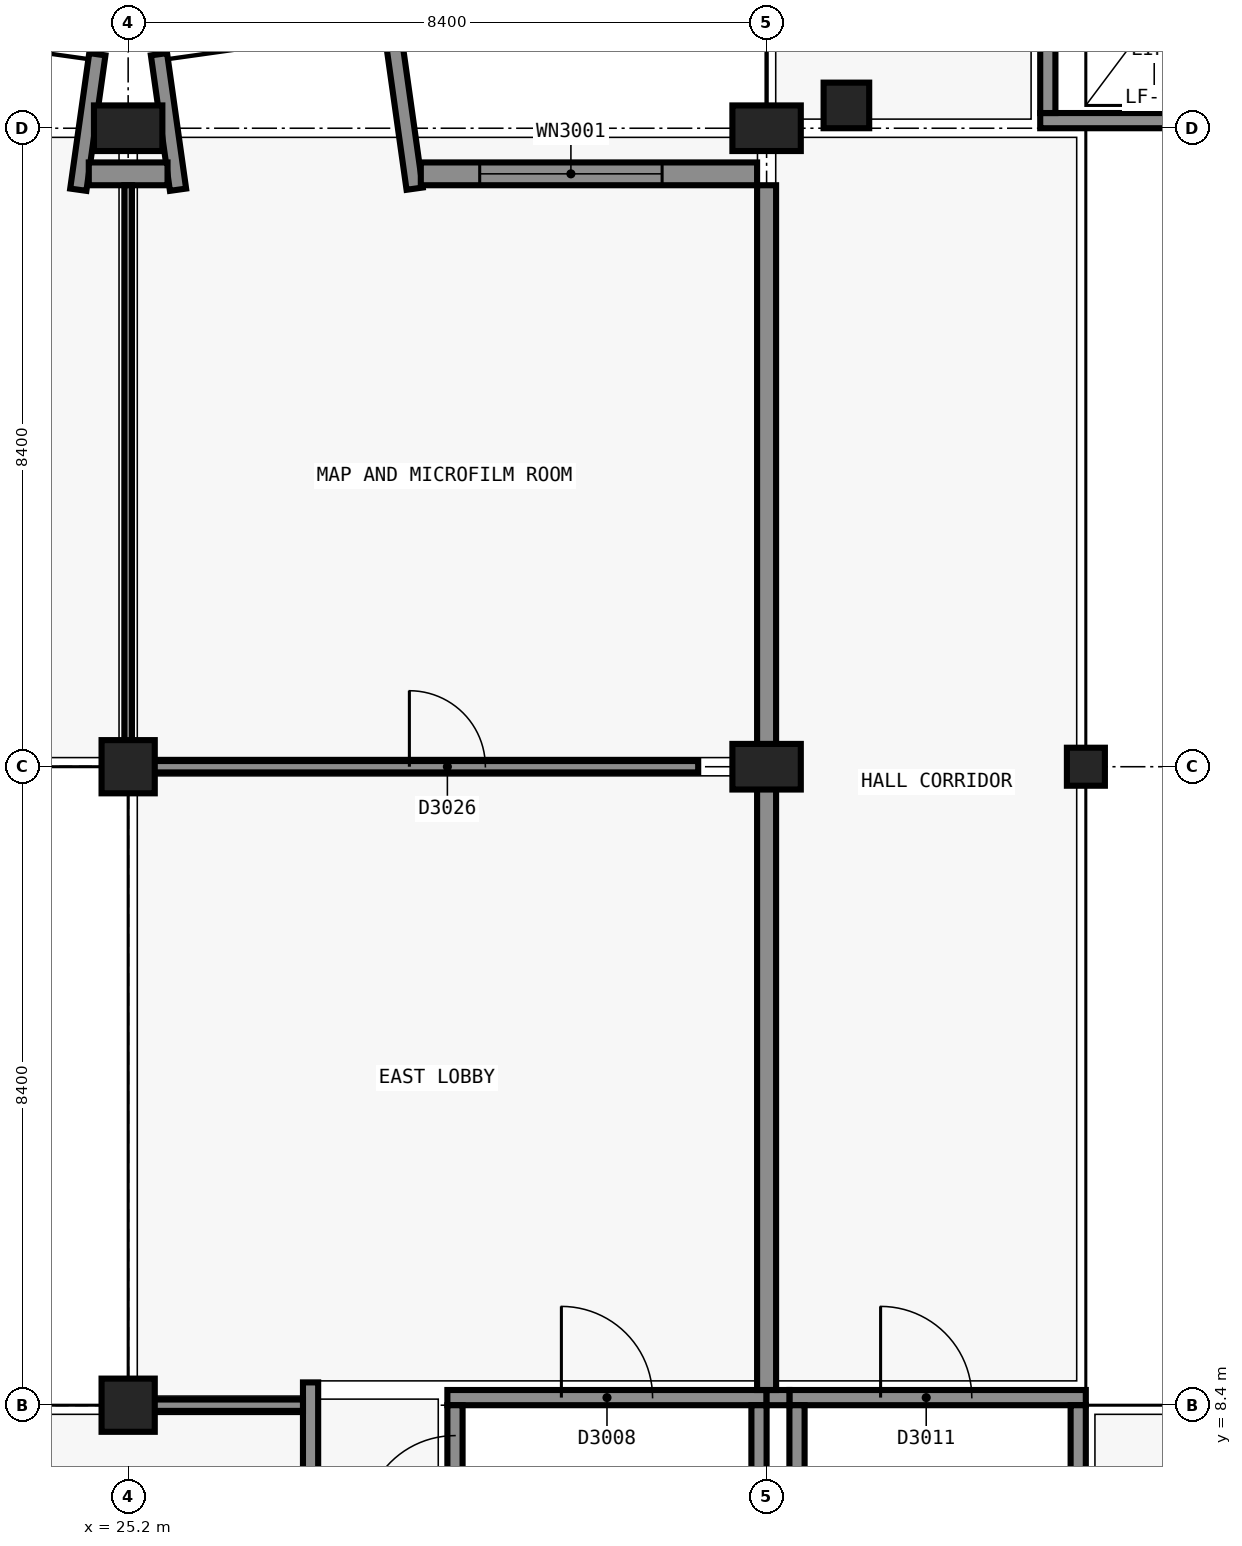
"""IFC4 building model, lengths in metres.
Left out: names, types, materials, properties, quantities, classifications, styles, units other than length and angle.
Written with IfcOpenShell. Run it as: python <this file> out.ifc"""

import sys

from ifc_helpers import new_model, si_unit, direction, frame, frame_2d, origin, origin_2d, place, context, subcontext, project, spatial, rectangle, extrude, element, fill, save


model = new_model("IFC4")
c1 = context("Model", 3, precision=1e-05, world=origin(), true_north=direction((0.0, 1.0)))
c2 = subcontext(c1, "Body", "Model", "MODEL_VIEW")
j1 = project(units=[si_unit("LENGTHUNIT", "METRE"), si_unit("PLANEANGLEUNIT", "RADIAN")], contexts=[c1])
p1 = place(None, origin())
s1 = spatial("IfcSite", under=j1, at=p1, CompositionType="ELEMENT")
p2 = place(p1, origin())
s2 = spatial("IfcBuilding", under=s1, at=p2, CompositionType="ELEMENT")
p3 = place(p2, frame((0.0, 0.0, 15.0)))
s3 = spatial("IfcBuildingStorey", under=s2, at=p3, CompositionType="ELEMENT", Elevation=15.0)
p4 = place(p3, frame((29.4, 8.5, 0.0), z_axis=(0.0, 0.0, 1.0), x_axis=(1.0, 0.0, 0.0)))
e1 = element("IfcWall", 1, at=p4, inside=s3, PredefinedType="SHEAR", context=c2, shape_type="SweptSolid", body=[
    extrude(rectangle(XDim=4.2, YDim=0.2, at=frame_2d((2.1, 0.0))), origin(), (0.0, 0.0, 1.0), 4.8),
])
p5 = place(p4, frame((1.5, 0.0, 0.0)))
e2 = element("IfcOpeningElement", 2, at=p5, cuts=e1, PredefinedType="OPENING", context=c2, shape_type="SweptSolid", body=[
    extrude(rectangle(XDim=1.2, YDim=2.1, at=frame_2d((0.6, 1.05))), frame((0.0, 0.11, 0.0), z_axis=(0.0, -1.0, 0.0), x_axis=(1.0, 0.0, 0.0)), (0.0, 0.0, 1.0), 0.22),
])
p6 = place(p3, frame((29.5, 0.2, 0.0), z_axis=(0.0, 0.0, 1.0), x_axis=(0.0, 1.0, 0.0)))
e3 = element("IfcWall", 3, at=p6, inside=s3, PredefinedType="SHEAR", context=c2, shape_type="SweptSolid", body=[
    extrude(rectangle(XDim=8.2, YDim=0.2, at=frame_2d((4.1, 0.0))), origin(), (0.0, 0.0, 1.0), 4.8),
])
p7 = place(p6, frame((6.6, 0.0, 0.0)))
e4 = element("IfcOpeningElement", 4, at=p7, cuts=e3, PredefinedType="OPENING", context=c2, shape_type="SweptSolid", body=[
    extrude(rectangle(XDim=1.2, YDim=2.1, at=frame_2d((0.6, 1.05))), frame((0.0, 0.11, 0.0), z_axis=(0.0, -1.0, 0.0), x_axis=(1.0, 0.0, 0.0)), (0.0, 0.0, 1.0), 0.22),
])
p8 = place(p3, frame((33.5, 8.4, 0.0), z_axis=(0.0, 0.0, 1.0), x_axis=(0.0, -1.0, 0.0)))
e5 = element("IfcWall", 5, at=p8, inside=s3, PredefinedType="SHEAR", context=c2, shape_type="SweptSolid", body=[
    extrude(rectangle(XDim=8.2, YDim=0.2, at=frame_2d((4.1, 0.0))), origin(), (0.0, 0.0, 1.0), 4.8),
])
p9 = place(p3, frame((33.9, 8.5, 0.0), z_axis=(0.0, 0.0, 1.0), x_axis=(1.0, 0.0, 0.0)))
e6 = element("IfcWall", 6, at=p9, inside=s3, PredefinedType="SHEAR", context=c2, shape_type="SweptSolid", body=[
    extrude(rectangle(XDim=3.9, YDim=0.2, at=frame_2d((1.95, 0.0))), origin(), (0.0, 0.0, 1.0), 4.8),
])
p10 = place(p9, frame((1.2, 0.0, 0.0)))
e7 = element("IfcOpeningElement", 7, at=p10, cuts=e6, PredefinedType="OPENING", context=c2, shape_type="SweptSolid", body=[
    extrude(rectangle(XDim=1.2, YDim=2.1, at=frame_2d((0.6, 1.05))), frame((0.0, 0.11, 0.0), z_axis=(0.0, -1.0, 0.0), x_axis=(1.0, 0.0, 0.0)), (0.0, 0.0, 1.0), 0.22),
])
p11 = place(p3, frame((34.0, 0.2, 0.0), z_axis=(0.0, 0.0, 1.0), x_axis=(0.0, 1.0, 0.0)))
e8 = element("IfcWall", 8, at=p11, inside=s3, PredefinedType="SHEAR", context=c2, shape_type="SweptSolid", body=[
    extrude(rectangle(XDim=8.2, YDim=0.2, at=frame_2d((4.1, 0.0))), origin(), (0.0, 0.0, 1.0), 4.8),
])
p12 = place(p3, frame((37.7, 8.4, 0.0), z_axis=(0.0, 0.0, 1.0), x_axis=(0.0, -1.0, 0.0)))
e9 = element("IfcWall", 9, at=p12, inside=s3, PredefinedType="SHEAR", context=c2, shape_type="SweptSolid", body=[
    extrude(rectangle(XDim=8.2, YDim=0.2, at=frame_2d((4.1, 0.0))), origin(), (0.0, 0.0, 1.0), 4.8),
])
p13 = place(p12, frame((0.9, 0.0, 0.0)))
e10 = element("IfcOpeningElement", 10, at=p13, cuts=e9, PredefinedType="OPENING", context=c2, shape_type="SweptSolid", body=[
    extrude(rectangle(XDim=1.2, YDim=2.1, at=frame_2d((0.6, 1.05))), frame((0.0, 0.11, 0.0), z_axis=(0.0, -1.0, 0.0), x_axis=(1.0, 0.0, 0.0)), (0.0, 0.0, 1.0), 0.22),
])
p14 = place(p3, frame((40.2, 25.3, 0.0), z_axis=(0.0, 0.0, 1.0), x_axis=(-1.0, 0.0, 0.0)))
e11 = element("IfcWall", 11, at=p14, inside=s3, PredefinedType="SHEAR", context=c2, shape_type="SweptSolid", body=[
    extrude(rectangle(XDim=3.0, YDim=0.2, at=frame_2d((1.5, 0.0))), origin(), (0.0, 0.0, 1.0), 4.8),
])
p15 = place(p3, frame((37.3, 25.4, 0.0), z_axis=(0.0, 0.0, 1.0), x_axis=(0.0, 1.0, 0.0)))
e12 = element("IfcWall", 12, at=p15, inside=s3, PredefinedType="SHEAR", context=c2, shape_type="SweptSolid", body=[
    extrude(rectangle(XDim=2.6, YDim=0.2, at=frame_2d((1.3, 0.0))), origin(), (0.0, 0.0, 1.0), 4.8),
])
for number, where, z_axis, x_axis in (
    (13, (25.2, 8.4, 0.0), (0.0, 0.0, 1.0), (1.0, 0.0, 0.0)),
    (14, (25.2, 16.8, 0.0), (0.0, 0.0, 1.0), (1.0, 0.0, 0.0)),
):
    element("IfcColumn", number, at=place(p3, frame(where, z_axis=z_axis, x_axis=x_axis)), inside=s3, PredefinedType="COLUMN", context=c2, shape_type="SweptSolid", body=[
        extrude(rectangle(XDim=0.7, YDim=0.7, at=origin_2d()), origin(), (0.0, 0.0, 1.0), 4.8),
    ])
for number, where, z_axis, x_axis in (
    (15, (25.2, 25.2, 0.0), (0.0, 0.0, 1.0), (1.0, 0.0, 0.0)),
    (16, (33.6, 16.8, 0.0), (0.0, 0.0, 1.0), (0.0, 1.0, 0.0)),
    (17, (33.6, 25.2, 0.0), (0.0, 0.0, 1.0), (1.0, 0.0, 0.0)),
):
    element("IfcColumn", number, at=place(p3, frame(where, z_axis=z_axis, x_axis=x_axis)), inside=s3, PredefinedType="COLUMN", context=c2, shape_type="SweptSolid", body=[
        extrude(rectangle(XDim=0.9, YDim=0.6, at=origin_2d()), origin(), (0.0, 0.0, 1.0), 4.8),
    ])
p16 = place(p3, frame((34.65, 25.5, 0.0), z_axis=(0.0, 0.0, 1.0), x_axis=(1.0, 0.0, 0.0)))
e18 = element("IfcColumn", 18, at=p16, inside=s3, PredefinedType="COLUMN", context=c2, shape_type="SweptSolid", body=[
    extrude(rectangle(XDim=0.6, YDim=0.6, at=origin_2d()), origin(), (0.0, 0.0, 1.0), 4.8),
])
p17 = place(p3, frame((33.6, 8.5, 0.0), z_axis=(0.0, 0.0, 1.0), x_axis=(1.0, 0.0, 0.0)))
e19 = element("IfcWall", 19, at=p17, inside=s3, PredefinedType="SHEAR", context=c2, shape_type="SweptSolid", body=[
    extrude(rectangle(XDim=0.3, YDim=0.2, at=frame_2d((0.15, 0.0))), origin(), (0.0, 0.0, 1.0), 4.8),
])
p18 = place(p3, frame((37.801, 16.8, 0.0), z_axis=(0.0, 0.0, 1.0), x_axis=(1.0, 0.0, 0.0)))
e20 = element("IfcColumn", 20, at=p18, inside=s3, PredefinedType="COLUMN", context=c2, shape_type="SweptSolid", body=[
    extrude(rectangle(XDim=0.5, YDim=0.5, at=origin_2d()), origin(), (0.0, 0.0, 1.0), 4.8),
])
for number, where, z_axis, x_axis in (
    (21, (24.544, 24.391, 0.0), (0.0, 0.0, 1.0), (0.139, 0.99, 0.0)),
    (22, (25.856, 24.391, 0.0), (0.0, 0.0, 1.0), (-0.139, 0.99, 0.0)),
):
    element("IfcWall", number, at=place(p3, frame(where, z_axis=z_axis, x_axis=x_axis)), inside=s3, PredefinedType="SOLIDWALL", context=c2, shape_type="SweptSolid", body=[
        extrude(rectangle(XDim=1.8, YDim=0.215, at=frame_2d((0.9, 0.0))), origin(), (0.0, 0.0, 1.0), 4.5),
    ])
p19 = place(p3, frame((28.969, 24.405, 0.0), z_axis=(0.0, 0.0, 1.0), x_axis=(-0.139249775508, 0.99025728981, 0.0)))
e23 = element("IfcWall", 23, at=p19, inside=s3, PredefinedType="SOLIDWALL", context=c2, shape_type="SweptSolid", body=[
    extrude(rectangle(XDim=2.22, YDim=0.215, at=frame_2d((1.11, 0.0))), origin(), (0.0, 0.0, 1.0), 4.5),
])
p20 = place(p3, frame((24.682, 24.6, 0.0), z_axis=(0.0, 0.0, 1.0), x_axis=(1.0, 0.0, 0.0)))
e24 = element("IfcWall", 24, at=p20, inside=s3, PredefinedType="SOLIDWALL", context=c2, shape_type="SweptSolid", body=[
    extrude(rectangle(XDim=1.036, YDim=0.3, at=frame_2d((0.518, 0.0))), origin(), (0.0, 0.0, 1.0), 4.5),
])
p21 = place(p3, frame((29.051, 24.6, 0.0), z_axis=(0.0, 0.0, 1.0), x_axis=(1.0, 0.0, 0.0)))
e25 = element("IfcWall", 25, at=p21, inside=s3, PredefinedType="SOLIDWALL", context=c2, shape_type="SweptSolid", body=[
    extrude(rectangle(XDim=4.425, YDim=0.3, at=frame_2d((2.212, 0.0))), origin(), (0.0, 0.0, 1.0), 4.5),
])
p22 = place(p21, frame((0.775, 0.0, 0.9)))
e26 = element("IfcOpeningElement", 26, at=p22, cuts=e25, PredefinedType="OPENING", context=c2, shape_type="SweptSolid", body=[
    extrude(rectangle(XDim=2.4, YDim=1.5, at=frame_2d((1.2, 0.75))), frame((0.0, 0.16, 0.0), z_axis=(0.0, -1.0, 0.0), x_axis=(1.0, 0.0, 0.0)), (0.0, 0.0, 1.0), 0.32),
])
p23 = place(p3, frame((33.6, 8.6, 0.0), z_axis=(0.0, 0.0, 1.0), x_axis=(0.0, 1.0, 0.0)))
e27 = element("IfcWall", 27, at=p23, inside=s3, PredefinedType="SOLIDWALL", context=c2, shape_type="SweptSolid", body=[
    extrude(rectangle(XDim=15.85, YDim=0.25, at=frame_2d((7.925, 0.0))), origin(), (0.0, 0.0, 1.0), 3.8),
])
p24 = place(p3, frame((27.6, 6.3, 0.0), z_axis=(0.0, 0.0, 1.0), x_axis=(0.0, 1.0, 0.0)))
e28 = element("IfcWall", 28, at=p24, inside=s3, PredefinedType="SOLIDWALL", context=c2, shape_type="SweptSolid", body=[
    extrude(rectangle(XDim=2.4, YDim=0.2, at=frame_2d((1.2, 0.0))), origin(), (0.0, 0.0, 1.0), 4.0),
])
p25 = place(p3, frame((25.125, 8.4, 0.0), z_axis=(0.0, 0.0, 1.0), x_axis=(1.0, 0.0, 0.0)))
e29 = element("IfcWall", 29, at=p25, inside=s3, PredefinedType="PARTITIONING", context=c2, shape_type="SweptSolid", body=[
    extrude(rectangle(XDim=2.375, YDim=0.15, at=frame_2d((1.188, 0.0))), origin(), (0.0, 0.0, 1.0), 3.8),
])
p26 = place(p3, frame((25.125, 16.8, 0.0), z_axis=(0.0, 0.0, 1.0), x_axis=(1.0, 0.0, 0.0)))
e30 = element("IfcWall", 30, at=p26, inside=s3, PredefinedType="PARTITIONING", context=c2, shape_type="SweptSolid", body=[
    extrude(rectangle(XDim=7.575, YDim=0.15, at=frame_2d((3.788, 0.0))), origin(), (0.0, 0.0, 1.0), 3.8),
])
p27 = place(p26, frame((3.775, 0.0, 0.0)))
e31 = element("IfcOpeningElement", 31, at=p27, cuts=e30, PredefinedType="OPENING", context=c2, shape_type="SweptSolid", body=[
    extrude(rectangle(XDim=1.0, YDim=2.1, at=frame_2d((0.5, 1.05))), frame((0.0, 0.085, 0.0), z_axis=(0.0, -1.0, 0.0), x_axis=(1.0, 0.0, 0.0)), (0.0, 0.0, 1.0), 0.17),
])
p28 = place(p3, frame((25.2, 16.875, 0.0), z_axis=(0.0, 0.0, 1.0), x_axis=(0.0, 1.0, 0.0)))
e32 = element("IfcWall", 32, at=p28, inside=s3, PredefinedType="PARTITIONING", context=c2, shape_type="SweptSolid", body=[
    extrude(rectangle(XDim=7.575, YDim=0.1, at=frame_2d((3.788, 0.0))), origin(), (0.0, 0.0, 1.0), 3.8),
])
p29 = place(p22, origin())
e33 = element("IfcWindow", 33, at=p29, inside=s3, PartitioningType="SINGLE_PANEL", PredefinedType="WINDOW", context=c2, shape_type="SweptSolid", body=[
    extrude(rectangle(XDim=2.4, YDim=1.5, at=frame_2d((1.2, 0.75))), frame((0.0, 0.03, 0.0), z_axis=(0.0, -1.0, 0.0), x_axis=(1.0, 0.0, 0.0)), (0.0, 0.0, 1.0), 0.06),
])
fill(e26, e33)
p30 = place(p7, origin())
e34 = element("IfcDoor", 34, at=p30, inside=s3, OperationType="SINGLE_SWING_RIGHT", PredefinedType="DOOR", context=c2, shape_type="SweptSolid", body=[
    extrude(rectangle(XDim=1.2, YDim=2.1, at=frame_2d((0.6, 1.05))), frame((0.0, 0.025, 0.0), z_axis=(0.0, -1.0, 0.0), x_axis=(1.0, 0.0, 0.0)), (0.0, 0.0, 1.0), 0.05),
])
fill(e4, e34)
p31 = place(p5, origin())
e35 = element("IfcDoor", 35, at=p31, inside=s3, OperationType="SINGLE_SWING_RIGHT", PredefinedType="DOOR", context=c2, shape_type="SweptSolid", body=[
    extrude(rectangle(XDim=1.2, YDim=2.1, at=frame_2d((0.6, 1.05))), frame((0.0, 0.025, 0.0), z_axis=(0.0, -1.0, 0.0), x_axis=(1.0, 0.0, 0.0)), (0.0, 0.0, 1.0), 0.05),
])
fill(e2, e35)
p32 = place(p10, origin())
e36 = element("IfcDoor", 36, at=p32, inside=s3, OperationType="SINGLE_SWING_RIGHT", PredefinedType="DOOR", context=c2, shape_type="SweptSolid", body=[
    extrude(rectangle(XDim=1.2, YDim=2.1, at=frame_2d((0.6, 1.05))), frame((0.0, 0.025, 0.0), z_axis=(0.0, -1.0, 0.0), x_axis=(1.0, 0.0, 0.0)), (0.0, 0.0, 1.0), 0.05),
])
fill(e7, e36)
p33 = place(p27, origin())
e37 = element("IfcDoor", 37, at=p33, inside=s3, OperationType="SINGLE_SWING_LEFT", PredefinedType="DOOR", context=c2, shape_type="SweptSolid", body=[
    extrude(rectangle(XDim=1.0, YDim=2.1, at=frame_2d((0.5, 1.05))), frame((0.0, 0.025, 0.0), z_axis=(0.0, -1.0, 0.0), x_axis=(1.0, 0.0, 0.0)), (0.0, 0.0, 1.0), 0.05),
])
fill(e31, e37)
save(model, sys.argv[1])
